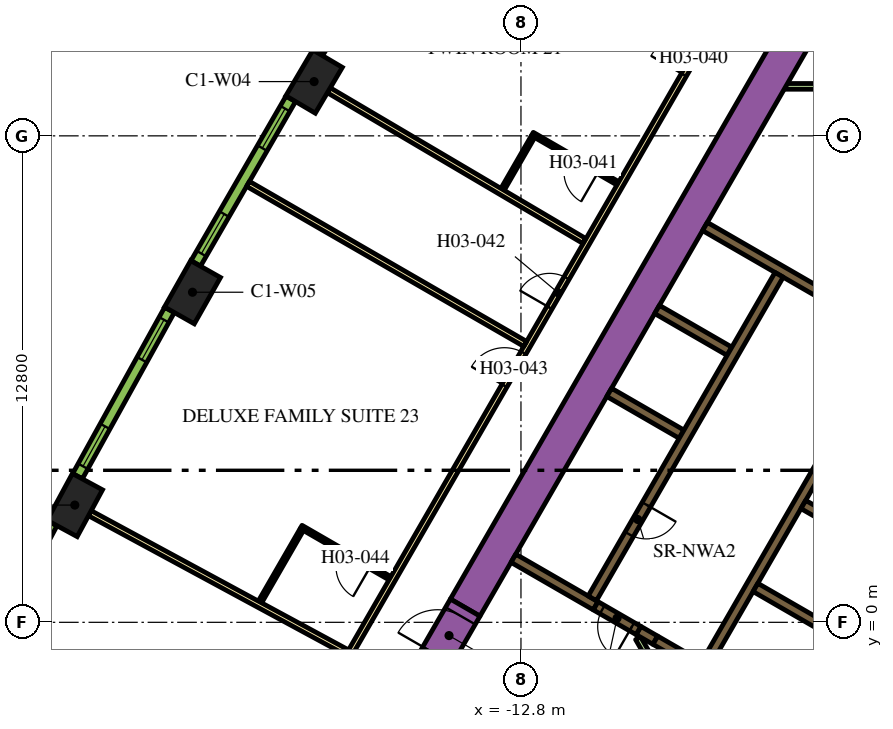
"""IFC4 building model, lengths in metres.
Left out: names, types, materials, properties, quantities, classifications, styles, units other than length and angle.
Written with IfcOpenShell. Run it as: python <this file> out.ifc"""

import sys

from ifc_helpers import new_model, si_unit, direction, frame, frame_2d, origin, origin_2d, place, context, subcontext, project, spatial, rectangle, extrude, element, fill, save


model = new_model("IFC4")
c1 = context("Model", 3, precision=1e-05, world=origin(), true_north=direction((0.0, 1.0)))
c2 = subcontext(c1, "Body", "Model", "MODEL_VIEW")
j1 = project(units=[si_unit("LENGTHUNIT", "METRE"), si_unit("PLANEANGLEUNIT", "RADIAN")], contexts=[c1])
p1 = place(None, origin())
s1 = spatial("IfcSite", under=j1, at=p1, CompositionType="ELEMENT")
p2 = place(p1, origin())
s2 = spatial("IfcBuilding", under=s1, at=p2, CompositionType="ELEMENT")
p3 = place(p2, frame((0.0, 0.0, 58.8)))
s3 = spatial("IfcBuildingStorey", under=s2, at=p3, CompositionType="ELEMENT", Elevation=58.8)
for number, where, z_axis, x_axis in (
    (1, (-18.243, 14.228, 0.0), (0.0, 0.0, 1.0), (-0.508, -0.861, 0.0)),
    (2, (-21.443, 8.685, 0.0), (0.0, 0.0, 1.0), (-0.492, -0.871, 0.0)),
    (3, (-24.54, 3.085, 0.0), (0.0, 0.0, 1.0), (-0.476, -0.88, 0.0)),
):
    element("IfcColumn", number, at=place(p3, frame(where, z_axis=z_axis, x_axis=x_axis)), inside=s3, PredefinedType="COLUMN", context=c2, shape_type="SweptSolid", body=[
        extrude(rectangle(XDim=1.4, YDim=0.9, at=origin_2d()), origin(), (0.0, 0.0, 1.0), 3.9),
    ])
p4 = place(p3, frame((-14.268, 0.387, 0.0), z_axis=(0.0, 0.0, 1.0), x_axis=(0.499994617707, 0.866028511231, 0.0)))
e4 = element("IfcWall", 4, at=p4, inside=s3, PredefinedType="SOLIDWALL", context=c2, shape_type="SweptSolid", body=[
    extrude(rectangle(XDim=18.817, YDim=0.9, at=frame_2d((9.409, 0.0))), origin(), (0.0, 0.0, 1.0), 3.9),
])
p5 = place(p3, frame((-8.06, -1.311, 0.0), z_axis=(0.0, 0.0, 1.0), x_axis=(0.50000273126, 0.866023826885, 0.0)))
e5 = element("IfcWall", 5, at=p5, inside=s3, PredefinedType="SOLIDWALL", context=c2, shape_type="SweptSolid", body=[
    extrude(rectangle(XDim=10.33, YDim=0.25, at=frame_2d((5.165, 0.0))), origin(), (0.0, 0.0, 1.0), 3.9),
])
for number, where, z_axis, x_axis in (
    (6, (-5.369, 3.1, 0.0), (0.0, 0.0, 1.0), (0.866, -0.5, 0.0)),
    (7, (-4.724, -0.182, 0.0), (0.0, 0.0, 1.0), (-0.866, 0.5, 0.0)),
):
    element("IfcWall", number, at=place(p3, frame(where, z_axis=z_axis, x_axis=x_axis)), inside=s3, PredefinedType="SOLIDWALL", context=c2, shape_type="SweptSolid", body=[
        extrude(rectangle(XDim=2.2, YDim=0.25, at=frame_2d((1.1, 0.0))), origin(), (0.0, 0.0, 1.0), 3.9),
    ])
p6 = place(p3, frame((-9.708, -0.215, 0.0), z_axis=(0.0, 0.0, 1.0), x_axis=(0.866113839764, -0.499846793097, 0.0)))
e8 = element("IfcWall", 8, at=p6, inside=s3, PredefinedType="SOLIDWALL", context=c2, shape_type="SweptSolid", body=[
    extrude(rectangle(XDim=0.51, YDim=0.25, at=frame_2d((0.255, 0.0))), origin(), (0.0, 0.0, 1.0), 3.9),
])
p7 = place(p3, frame((-12.999, 1.685, 0.0), z_axis=(0.0, 0.0, 1.0), x_axis=(0.865996765544, -0.500049599607, 0.0)))
e9 = element("IfcWall", 9, at=p7, inside=s3, PredefinedType="SOLIDWALL", context=c2, shape_type="SweptSolid", body=[
    extrude(rectangle(XDim=2.498, YDim=0.25, at=frame_2d((1.249, 0.0))), origin(), (0.0, 0.0, 1.0), 3.9),
])
p8 = place(p3, frame((-9.265, -0.471, 0.0), z_axis=(0.0, 0.0, 1.0), x_axis=(0.865954634268, -0.500122556369, 0.0)))
e10 = element("IfcWall", 10, at=p8, inside=s3, PredefinedType="SOLIDWALL", context=c2, shape_type="SweptSolid", body=[
    extrude(rectangle(XDim=1.338, YDim=0.25, at=frame_2d((0.669, 0.0))), origin(), (0.0, 0.0, 1.0), 3.9),
])
for number, where, z_axis, x_axis in (
    (11, (-8.574, 4.95, 0.0), (0.0, 0.0, 1.0), (-0.866, 0.5, 0.0)),
    (12, (-7.314, 7.132, 0.0), (0.0, 0.0, 1.0), (-0.866, 0.5, 0.0)),
):
    element("IfcWall", number, at=place(p3, frame(where, z_axis=z_axis, x_axis=x_axis)), inside=s3, PredefinedType="SOLIDWALL", context=c2, shape_type="SweptSolid", body=[
        extrude(rectangle(XDim=2.2, YDim=0.25, at=frame_2d((1.1, 0.0))), origin(), (0.0, 0.0, 1.0), 3.9),
    ])
p9 = place(p3, frame((-7.959, 10.415, 0.0), z_axis=(0.0, 0.0, 1.0), x_axis=(0.866020958405, -0.500007699544, 0.0)))
e13 = element("IfcWall", 13, at=p9, inside=s3, PredefinedType="SOLIDWALL", context=c2, shape_type="SweptSolid", body=[
    extrude(rectangle(XDim=4.1, YDim=0.25, at=frame_2d((2.05, 0.0))), origin(), (0.0, 0.0, 1.0), 3.9),
])
p10 = place(p3, frame((-9.512, -0.775, 0.0), z_axis=(0.0, 0.0, 1.0), x_axis=(-0.500080620599, 0.865978852456, 0.0)))
e14 = element("IfcWall", 14, at=p10, inside=s3, PredefinedType="PARTITIONING", context=c2, shape_type="SweptSolid", body=[
    extrude(rectangle(XDim=0.413, YDim=0.15, at=frame_2d((0.207, 0.0))), origin(), (0.0, 0.0, 1.0), 2.75),
])
p11 = place(p3, frame((-5.851, 14.102, 0.0), z_axis=(0.0, 0.0, 1.0), x_axis=(1.0, 0.0, 0.0)))
e15 = element("IfcWall", 15, at=p11, inside=s3, PredefinedType="PARTITIONING", context=c2, shape_type="SweptSolid", body=[
    extrude(rectangle(XDim=1.18, YDim=0.15, at=frame_2d((0.59, 0.0))), origin(), (0.0, 0.0, 1.0), 2.75),
])
p12 = place(p3, frame((-6.008, 9.144, 0.0), z_axis=(0.0, 0.0, 1.0), x_axis=(-0.500006956611, -0.866021387346, 0.0)))
e16 = element("IfcWall", 16, at=p12, inside=s3, PredefinedType="SOLIDWALL", context=c2, shape_type="SweptSolid", body=[
    extrude(rectangle(XDim=9.83, YDim=0.25, at=frame_2d((4.915, 0.0))), origin(), (0.0, 0.0, 1.0), 3.9),
])
p13 = place(p12, frame((6.985, 0.0, 0.0)))
e17 = element("IfcOpeningElement", 17, at=p13, cuts=e16, PredefinedType="OPENING", context=c2, shape_type="SweptSolid", body=[
    extrude(rectangle(XDim=0.9, YDim=2.1, at=frame_2d((0.45, 1.05))), frame((0.0, 0.135, 0.0), z_axis=(0.0, -1.0, 0.0), x_axis=(1.0, 0.0, 0.0)), (0.0, 0.0, 1.0), 0.27),
])
p14 = place(p3, frame((-0.898, 6.194, 0.0), z_axis=(0.0, 0.0, 1.0), x_axis=(-0.499996202215, -0.866027596426, 0.0)))
e18 = element("IfcWall", 18, at=p14, inside=s3, PredefinedType="SOLIDWALL", context=c2, shape_type="SweptSolid", body=[
    extrude(rectangle(XDim=9.83, YDim=0.25, at=frame_2d((4.915, 0.0))), origin(), (0.0, 0.0, 1.0), 3.9),
])
p15 = place(p14, frame((0.585, 0.0, 0.0)))
e19 = element("IfcOpeningElement", 19, at=p15, cuts=e18, PredefinedType="OPENING", context=c2, shape_type="SweptSolid", body=[
    extrude(rectangle(XDim=1.1, YDim=2.1, at=frame_2d((0.55, 1.05))), frame((0.0, 0.135, 0.0), z_axis=(0.0, -1.0, 0.0), x_axis=(1.0, 0.0, 0.0)), (0.0, 0.0, 1.0), 0.27),
])
p16 = place(p14, frame((3.105, 0.0, 0.0)))
e20 = element("IfcOpeningElement", 20, at=p16, cuts=e18, PredefinedType="OPENING", context=c2, shape_type="SweptSolid", body=[
    extrude(rectangle(XDim=1.1, YDim=2.1, at=frame_2d((0.55, 1.05))), frame((0.0, 0.135, 0.0), z_axis=(0.0, -1.0, 0.0), x_axis=(1.0, 0.0, 0.0)), (0.0, 0.0, 1.0), 0.27),
])
p17 = place(p14, frame((5.625, 0.0, 0.0)))
e21 = element("IfcOpeningElement", 21, at=p17, cuts=e18, PredefinedType="OPENING", context=c2, shape_type="SweptSolid", body=[
    extrude(rectangle(XDim=1.1, YDim=2.1, at=frame_2d((0.55, 1.05))), frame((0.0, 0.135, 0.0), z_axis=(0.0, -1.0, 0.0), x_axis=(1.0, 0.0, 0.0)), (0.0, 0.0, 1.0), 0.27),
])
p18 = place(p14, frame((8.145, 0.0, 0.0)))
e22 = element("IfcOpeningElement", 22, at=p18, cuts=e18, PredefinedType="OPENING", context=c2, shape_type="SweptSolid", body=[
    extrude(rectangle(XDim=1.1, YDim=2.1, at=frame_2d((0.55, 1.05))), frame((0.0, 0.135, 0.0), z_axis=(0.0, -1.0, 0.0), x_axis=(1.0, 0.0, 0.0)), (0.0, 0.0, 1.0), 0.27),
])
p19 = place(p3, frame((-9.708, -0.215, 0.0), z_axis=(0.0, 0.0, 1.0), x_axis=(-0.866004217611, 0.500036693733, 0.0)))
e23 = element("IfcWall", 23, at=p19, inside=s3, PredefinedType="SOLIDWALL", context=c2, shape_type="SweptSolid", body=[
    extrude(rectangle(XDim=1.3, YDim=0.25, at=frame_2d((0.65, 0.0))), origin(), (0.0, 0.0, 1.0), 3.9),
])
p20 = place(p19, frame((0.2, 0.0, 0.0)))
e24 = element("IfcOpeningElement", 24, at=p20, cuts=e23, PredefinedType="OPENING", context=c2, shape_type="SweptSolid", body=[
    extrude(rectangle(XDim=0.9, YDim=2.1, at=frame_2d((0.45, 1.05))), frame((0.0, 0.135, 0.0), z_axis=(0.0, -1.0, 0.0), x_axis=(1.0, 0.0, 0.0)), (0.0, 0.0, 1.0), 0.27),
])
p21 = place(p3, frame((-15.118, -1.085, 0.0), z_axis=(0.0, 0.0, 1.0), x_axis=(0.500000056704, 0.866025371046, 0.0)))
e25 = element("IfcWall", 25, at=p21, inside=s3, PredefinedType="SOLIDWALL", context=c2, shape_type="SweptSolid", body=[
    extrude(rectangle(XDim=1.7, YDim=0.9, at=frame_2d((0.85, 0.0))), origin(), (0.0, 0.0, 1.0), 3.9),
])
p22 = place(p21, frame((0.25, 0.0, 0.0)))
e26 = element("IfcOpeningElement", 26, at=p22, cuts=e25, PredefinedType="OPENING", context=c2, shape_type="SweptSolid", body=[
    extrude(rectangle(XDim=1.2, YDim=2.1, at=frame_2d((0.6, 1.05))), frame((0.0, 0.46, 0.0), z_axis=(0.0, -1.0, 0.0), x_axis=(1.0, 0.0, 0.0)), (0.0, 0.0, 1.0), 0.92),
])
p23 = place(p3, frame((-19.081, -3.9, 0.0), z_axis=(0.0, 0.0, 1.0), x_axis=(0.499998313975, 0.866026377209, 0.0)))
e27 = element("IfcWall", 27, at=p23, inside=s3, PredefinedType="PARTITIONING", context=c2, shape_type="SweptSolid", body=[
    extrude(rectangle(XDim=25.766, YDim=0.15, at=frame_2d((12.883, 0.0))), origin(), (0.0, 0.0, 1.0), 2.75),
])
p24 = place(p23, frame((22.445, 0.0, 0.0)))
e28 = element("IfcOpeningElement", 28, at=p24, cuts=e27, PredefinedType="OPENING", context=c2, shape_type="SweptSolid", body=[
    extrude(rectangle(XDim=1.0, YDim=2.1, at=frame_2d((0.5, 1.05))), frame((0.0, 0.085, 0.0), z_axis=(0.0, -1.0, 0.0), x_axis=(1.0, 0.0, 0.0)), (0.0, 0.0, 1.0), 0.17),
])
p25 = place(p23, frame((21.138, 0.0, 0.0)))
e29 = element("IfcOpeningElement", 29, at=p25, cuts=e27, PredefinedType="OPENING", context=c2, shape_type="SweptSolid", body=[
    extrude(rectangle(XDim=1.0, YDim=2.1, at=frame_2d((0.5, 1.05))), frame((0.0, 0.085, 0.0), z_axis=(0.0, -1.0, 0.0), x_axis=(1.0, 0.0, 0.0)), (0.0, 0.0, 1.0), 0.17),
])
p26 = place(p23, frame((14.066, 0.0, 0.0)))
e30 = element("IfcOpeningElement", 30, at=p26, cuts=e27, PredefinedType="OPENING", context=c2, shape_type="SweptSolid", body=[
    extrude(rectangle(XDim=0.9, YDim=2.1, at=frame_2d((0.45, 1.05))), frame((0.0, 0.085, 0.0), z_axis=(0.0, -1.0, 0.0), x_axis=(1.0, 0.0, 0.0)), (0.0, 0.0, 1.0), 0.17),
])
p27 = place(p23, frame((11.693, 0.0, 0.0)))
e31 = element("IfcOpeningElement", 31, at=p27, cuts=e27, PredefinedType="OPENING", context=c2, shape_type="SweptSolid", body=[
    extrude(rectangle(XDim=1.0, YDim=2.1, at=frame_2d((0.5, 1.05))), frame((0.0, 0.085, 0.0), z_axis=(0.0, -1.0, 0.0), x_axis=(1.0, 0.0, 0.0)), (0.0, 0.0, 1.0), 0.17),
])
p28 = place(p3, frame((-24.145, 2.871, 0.0), z_axis=(0.0, 0.0, 1.0), x_axis=(0.879551725039, -0.475803281809, 0.0)))
e32 = element("IfcWall", 32, at=p28, inside=s3, PredefinedType="PARTITIONING", context=c2, shape_type="SweptSolid", body=[
    extrude(rectangle(XDim=7.688, YDim=0.15, at=frame_2d((3.844, 0.0))), origin(), (0.0, 0.0, 1.0), 2.75),
])
p29 = place(p3, frame((-19.982, 11.537, 0.0), z_axis=(0.0, 0.0, 1.0), x_axis=(0.866020994654, -0.500007636761, 0.0)))
e33 = element("IfcWall", 33, at=p29, inside=s3, PredefinedType="PARTITIONING", context=c2, shape_type="SweptSolid", body=[
    extrude(rectangle(XDim=8.423, YDim=0.15, at=frame_2d((4.211, 0.0))), origin(), (0.0, 0.0, 1.0), 2.75),
])
p30 = place(p3, frame((-17.856, 13.999, 0.0), z_axis=(0.0, 0.0, 1.0), x_axis=(0.861371519381, -0.507975497047, 0.0)))
e34 = element("IfcWall", 34, at=p30, inside=s3, PredefinedType="PARTITIONING", context=c2, shape_type="SweptSolid", body=[
    extrude(rectangle(XDim=7.804, YDim=0.15, at=frame_2d((3.902, 0.0))), origin(), (0.0, 0.0, 1.0), 2.75),
])
p31 = place(p3, frame((-10.249, 11.549, 0.0), z_axis=(0.0, 0.0, 1.0), x_axis=(-0.866021400173, 0.500006934395, 0.0)))
e35 = element("IfcWall", 35, at=p31, inside=s3, PredefinedType="PARTITIONING", context=c2, shape_type="SweptSolid", body=[
    extrude(rectangle(XDim=2.6, YDim=0.1, at=frame_2d((1.3, 0.0))), origin(), (0.0, 0.0, 1.0), 2.75),
])
p32 = place(p31, frame((0.6, 0.0, 0.0)))
e36 = element("IfcOpeningElement", 36, at=p32, cuts=e35, PredefinedType="OPENING", context=c2, shape_type="SweptSolid", body=[
    extrude(rectangle(XDim=0.9, YDim=2.1, at=frame_2d((0.45, 1.05))), frame((0.0, 0.06, 0.0), z_axis=(0.0, -1.0, 0.0), x_axis=(1.0, 0.0, 0.0)), (0.0, 0.0, 1.0), 0.12),
])
p33 = place(p3, frame((-12.487, 12.772, 0.0), z_axis=(0.0, 0.0, 1.0), x_axis=(-0.500085729368, -0.865975902253, 0.0)))
e37 = element("IfcWall", 37, at=p33, inside=s3, PredefinedType="PARTITIONING", context=c2, shape_type="SweptSolid", body=[
    extrude(rectangle(XDim=1.59, YDim=0.1, at=frame_2d((0.795, 0.0))), origin(), (0.0, 0.0, 1.0), 2.75),
])
p34 = place(p3, frame((-16.247, 1.159, 0.0), z_axis=(0.0, 0.0, 1.0), x_axis=(-0.866059108428, 0.4999416173, 0.0)))
e38 = element("IfcWall", 38, at=p34, inside=s3, PredefinedType="PARTITIONING", context=c2, shape_type="SweptSolid", body=[
    extrude(rectangle(XDim=2.7, YDim=0.1, at=frame_2d((1.35, 0.0))), origin(), (0.0, 0.0, 1.0), 2.75),
])
p35 = place(p34, frame((0.6, 0.0, 0.0)))
e39 = element("IfcOpeningElement", 39, at=p35, cuts=e38, PredefinedType="OPENING", context=c2, shape_type="SweptSolid", body=[
    extrude(rectangle(XDim=0.9, YDim=2.1, at=frame_2d((0.45, 1.05))), frame((0.0, 0.06, 0.0), z_axis=(0.0, -1.0, 0.0), x_axis=(1.0, 0.0, 0.0)), (0.0, 0.0, 1.0), 0.12),
])
p36 = place(p3, frame((-18.567, 2.441, 0.0), z_axis=(0.0, 0.0, 1.0), x_axis=(-0.499946605688, -0.86605622881, 0.0)))
e40 = element("IfcWall", 40, at=p36, inside=s3, PredefinedType="PARTITIONING", context=c2, shape_type="SweptSolid", body=[
    extrude(rectangle(XDim=2.2, YDim=0.1, at=frame_2d((1.1, 0.0))), origin(), (0.0, 0.0, 1.0), 2.75),
])
p37 = place(p3, frame((-15.564, 19.267, 0.0), z_axis=(0.0, 0.0, 1.0), x_axis=(-0.515938796285, -0.856625448191, 0.0)))
e41 = element("IfcWall", 41, at=p37, inside=s3, PredefinedType="SOLIDWALL", context=c2, shape_type="SweptSolid", body=[
    extrude(rectangle(XDim=4.998, YDim=0.29, at=frame_2d((2.499, 0.0))), origin(), (0.0, 0.0, 1.0), 3.65),
])
p38 = place(p37, frame((0.297, 0.0, 0.9)))
e42 = element("IfcOpeningElement", 42, at=p38, cuts=e41, PredefinedType="OPENING", context=c2, shape_type="SweptSolid", body=[
    extrude(rectangle(XDim=1.2, YDim=2.15, at=frame_2d((0.6, 1.075))), frame((0.0, 0.155, 0.0), z_axis=(0.0, -1.0, 0.0), x_axis=(1.0, 0.0, 0.0)), (0.0, 0.0, 1.0), 0.31),
])
p39 = place(p37, frame((3.501, 0.0, 0.9)))
e43 = element("IfcOpeningElement", 43, at=p39, cuts=e41, PredefinedType="OPENING", context=c2, shape_type="SweptSolid", body=[
    extrude(rectangle(XDim=1.2, YDim=2.15, at=frame_2d((0.6, 1.075))), frame((0.0, 0.155, 0.0), z_axis=(0.0, -1.0, 0.0), x_axis=(1.0, 0.0, 0.0)), (0.0, 0.0, 1.0), 0.31),
])
p40 = place(p3, frame((-18.858, 13.773, 0.0), z_axis=(0.0, 0.0, 1.0), x_axis=(-0.50002123722, -0.866013142123, 0.0)))
e44 = element("IfcWall", 44, at=p40, inside=s3, PredefinedType="SOLIDWALL", context=c2, shape_type="SweptSolid", body=[
    extrude(rectangle(XDim=4.998, YDim=0.29, at=frame_2d((2.499, 0.0))), origin(), (0.0, 0.0, 1.0), 3.65),
])
p41 = place(p40, frame((0.297, 0.0, 0.9)))
e45 = element("IfcOpeningElement", 45, at=p41, cuts=e44, PredefinedType="OPENING", context=c2, shape_type="SweptSolid", body=[
    extrude(rectangle(XDim=1.2, YDim=2.15, at=frame_2d((0.6, 1.075))), frame((0.0, 0.155, 0.0), z_axis=(0.0, -1.0, 0.0), x_axis=(1.0, 0.0, 0.0)), (0.0, 0.0, 1.0), 0.31),
])
p42 = place(p40, frame((3.501, 0.0, 0.9)))
e46 = element("IfcOpeningElement", 46, at=p42, cuts=e44, PredefinedType="OPENING", context=c2, shape_type="SweptSolid", body=[
    extrude(rectangle(XDim=1.2, YDim=2.15, at=frame_2d((0.6, 1.075))), frame((0.0, 0.155, 0.0), z_axis=(0.0, -1.0, 0.0), x_axis=(1.0, 0.0, 0.0)), (0.0, 0.0, 1.0), 0.31),
])
p43 = place(p3, frame((-22.05, 8.22, 0.0), z_axis=(0.0, 0.0, 1.0), x_axis=(-0.483912572871, -0.875116347589, 0.0)))
e47 = element("IfcWall", 47, at=p43, inside=s3, PredefinedType="SOLIDWALL", context=c2, shape_type="SweptSolid", body=[
    extrude(rectangle(XDim=4.998, YDim=0.29, at=frame_2d((2.499, 0.0))), origin(), (0.0, 0.0, 1.0), 3.65),
])
p44 = place(p43, frame((0.297, 0.0, 0.9)))
e48 = element("IfcOpeningElement", 48, at=p44, cuts=e47, PredefinedType="OPENING", context=c2, shape_type="SweptSolid", body=[
    extrude(rectangle(XDim=1.2, YDim=2.15, at=frame_2d((0.6, 1.075))), frame((0.0, 0.155, 0.0), z_axis=(0.0, -1.0, 0.0), x_axis=(1.0, 0.0, 0.0)), (0.0, 0.0, 1.0), 0.31),
])
p45 = place(p43, frame((3.501, 0.0, 0.9)))
e49 = element("IfcOpeningElement", 49, at=p45, cuts=e47, PredefinedType="OPENING", context=c2, shape_type="SweptSolid", body=[
    extrude(rectangle(XDim=1.2, YDim=2.15, at=frame_2d((0.6, 1.075))), frame((0.0, 0.155, 0.0), z_axis=(0.0, -1.0, 0.0), x_axis=(1.0, 0.0, 0.0)), (0.0, 0.0, 1.0), 0.31),
])
p46 = place(p3, frame((-25.138, 2.608, 0.0), z_axis=(0.0, 0.0, 1.0), x_axis=(-0.467629620899, -0.883924509026, 0.0)))
e50 = element("IfcWall", 50, at=p46, inside=s3, PredefinedType="SOLIDWALL", context=c2, shape_type="SweptSolid", body=[
    extrude(rectangle(XDim=4.998, YDim=0.29, at=frame_2d((2.499, 0.0))), origin(), (0.0, 0.0, 1.0), 3.65),
])
p47 = place(p46, frame((0.297, 0.0, 0.9)))
e51 = element("IfcOpeningElement", 51, at=p47, cuts=e50, PredefinedType="OPENING", context=c2, shape_type="SweptSolid", body=[
    extrude(rectangle(XDim=1.2, YDim=2.15, at=frame_2d((0.6, 1.075))), frame((0.0, 0.155, 0.0), z_axis=(0.0, -1.0, 0.0), x_axis=(1.0, 0.0, 0.0)), (0.0, 0.0, 1.0), 0.31),
])
p48 = place(p46, frame((3.501, 0.0, 0.9)))
e52 = element("IfcOpeningElement", 52, at=p48, cuts=e50, PredefinedType="OPENING", context=c2, shape_type="SweptSolid", body=[
    extrude(rectangle(XDim=1.2, YDim=2.15, at=frame_2d((0.6, 1.075))), frame((0.0, 0.155, 0.0), z_axis=(0.0, -1.0, 0.0), x_axis=(1.0, 0.0, 0.0)), (0.0, 0.0, 1.0), 0.31),
])
p49 = place(p13, origin())
e53 = element("IfcDoor", 53, at=p49, inside=s3, OperationType="SINGLE_SWING_LEFT", PredefinedType="DOOR", context=c2, shape_type="SweptSolid", body=[
    extrude(rectangle(XDim=0.9, YDim=2.1, at=frame_2d((0.45, 1.05))), frame((0.0, 0.025, 0.0), z_axis=(0.0, -1.0, 0.0), x_axis=(1.0, 0.0, 0.0)), (0.0, 0.0, 1.0), 0.05),
])
fill(e17, e53)
p50 = place(p20, origin())
e54 = element("IfcDoor", 54, at=p50, inside=s3, OperationType="SINGLE_SWING_LEFT", PredefinedType="DOOR", context=c2, shape_type="SweptSolid", body=[
    extrude(rectangle(XDim=0.9, YDim=2.1, at=frame_2d((0.45, 1.05))), frame((0.0, 0.025, 0.0), z_axis=(0.0, -1.0, 0.0), x_axis=(1.0, 0.0, 0.0)), (0.0, 0.0, 1.0), 0.05),
])
fill(e24, e54)
p51 = place(p22, origin())
e55 = element("IfcDoor", 55, at=p51, inside=s3, OperationType="SINGLE_SWING_LEFT", PredefinedType="DOOR", context=c2, shape_type="SweptSolid", body=[
    extrude(rectangle(XDim=1.2, YDim=2.1, at=frame_2d((0.6, 1.05))), frame((0.0, 0.025, 0.0), z_axis=(0.0, -1.0, 0.0), x_axis=(1.0, 0.0, 0.0)), (0.0, 0.0, 1.0), 0.05),
])
fill(e26, e55)
p52 = place(p25, origin())
e56 = element("IfcDoor", 56, at=p52, inside=s3, OperationType="SINGLE_SWING_RIGHT", PredefinedType="DOOR", context=c2, shape_type="SweptSolid", body=[
    extrude(rectangle(XDim=1.0, YDim=2.1, at=frame_2d((0.5, 1.05))), frame((0.0, 0.025, 0.0), z_axis=(0.0, -1.0, 0.0), x_axis=(1.0, 0.0, 0.0)), (0.0, 0.0, 1.0), 0.05),
])
fill(e29, e56)
p53 = place(p32, origin())
e57 = element("IfcDoor", 57, at=p53, inside=s3, OperationType="SINGLE_SWING_RIGHT", PredefinedType="DOOR", context=c2, shape_type="SweptSolid", body=[
    extrude(rectangle(XDim=0.9, YDim=2.1, at=frame_2d((0.45, 1.05))), frame((0.0, 0.025, 0.0), z_axis=(0.0, -1.0, 0.0), x_axis=(1.0, 0.0, 0.0)), (0.0, 0.0, 1.0), 0.05),
])
fill(e36, e57)
p54 = place(p26, origin())
e58 = element("IfcDoor", 58, at=p54, inside=s3, OperationType="SINGLE_SWING_RIGHT", PredefinedType="DOOR", context=c2, shape_type="SweptSolid", body=[
    extrude(rectangle(XDim=0.9, YDim=2.1, at=frame_2d((0.45, 1.05))), frame((0.0, 0.025, 0.0), z_axis=(0.0, -1.0, 0.0), x_axis=(1.0, 0.0, 0.0)), (0.0, 0.0, 1.0), 0.05),
])
fill(e30, e58)
p55 = place(p27, origin())
e59 = element("IfcDoor", 59, at=p55, inside=s3, OperationType="SINGLE_SWING_RIGHT", PredefinedType="DOOR", context=c2, shape_type="SweptSolid", body=[
    extrude(rectangle(XDim=1.0, YDim=2.1, at=frame_2d((0.5, 1.05))), frame((0.0, 0.025, 0.0), z_axis=(0.0, -1.0, 0.0), x_axis=(1.0, 0.0, 0.0)), (0.0, 0.0, 1.0), 0.05),
])
fill(e31, e59)
p56 = place(p35, origin())
e60 = element("IfcDoor", 60, at=p56, inside=s3, OperationType="SINGLE_SWING_LEFT", PredefinedType="DOOR", context=c2, shape_type="SweptSolid", body=[
    extrude(rectangle(XDim=0.9, YDim=2.1, at=frame_2d((0.45, 1.05))), frame((0.0, 0.025, 0.0), z_axis=(0.0, -1.0, 0.0), x_axis=(1.0, 0.0, 0.0)), (0.0, 0.0, 1.0), 0.05),
])
fill(e39, e60)
p57 = place(p41, origin())
e61 = element("IfcWindow", 61, at=p57, inside=s3, PartitioningType="DOUBLE_PANEL_VERTICAL", PredefinedType="WINDOW", context=c2, shape_type="SweptSolid", body=[
    extrude(rectangle(XDim=1.2, YDim=2.15, at=frame_2d((0.6, 1.075))), frame((0.0, 0.015, 0.0), z_axis=(0.0, -1.0, 0.0), x_axis=(1.0, 0.0, 0.0)), (0.0, 0.0, 1.0), 0.06),
])
fill(e45, e61)
p58 = place(p42, origin())
e62 = element("IfcWindow", 62, at=p58, inside=s3, PartitioningType="DOUBLE_PANEL_VERTICAL", PredefinedType="WINDOW", context=c2, shape_type="SweptSolid", body=[
    extrude(rectangle(XDim=1.2, YDim=2.15, at=frame_2d((0.6, 1.075))), frame((0.0, 0.015, 0.0), z_axis=(0.0, -1.0, 0.0), x_axis=(1.0, 0.0, 0.0)), (0.0, 0.0, 1.0), 0.06),
])
fill(e46, e62)
p59 = place(p44, origin())
e63 = element("IfcWindow", 63, at=p59, inside=s3, PartitioningType="DOUBLE_PANEL_VERTICAL", PredefinedType="WINDOW", context=c2, shape_type="SweptSolid", body=[
    extrude(rectangle(XDim=1.2, YDim=2.15, at=frame_2d((0.6, 1.075))), frame((0.0, 0.015, 0.0), z_axis=(0.0, -1.0, 0.0), x_axis=(1.0, 0.0, 0.0)), (0.0, 0.0, 1.0), 0.06),
])
fill(e48, e63)
p60 = place(p45, origin())
e64 = element("IfcWindow", 64, at=p60, inside=s3, PartitioningType="DOUBLE_PANEL_VERTICAL", PredefinedType="WINDOW", context=c2, shape_type="SweptSolid", body=[
    extrude(rectangle(XDim=1.2, YDim=2.15, at=frame_2d((0.6, 1.075))), frame((0.0, 0.015, 0.0), z_axis=(0.0, -1.0, 0.0), x_axis=(1.0, 0.0, 0.0)), (0.0, 0.0, 1.0), 0.06),
])
fill(e49, e64)
save(model, sys.argv[1])
